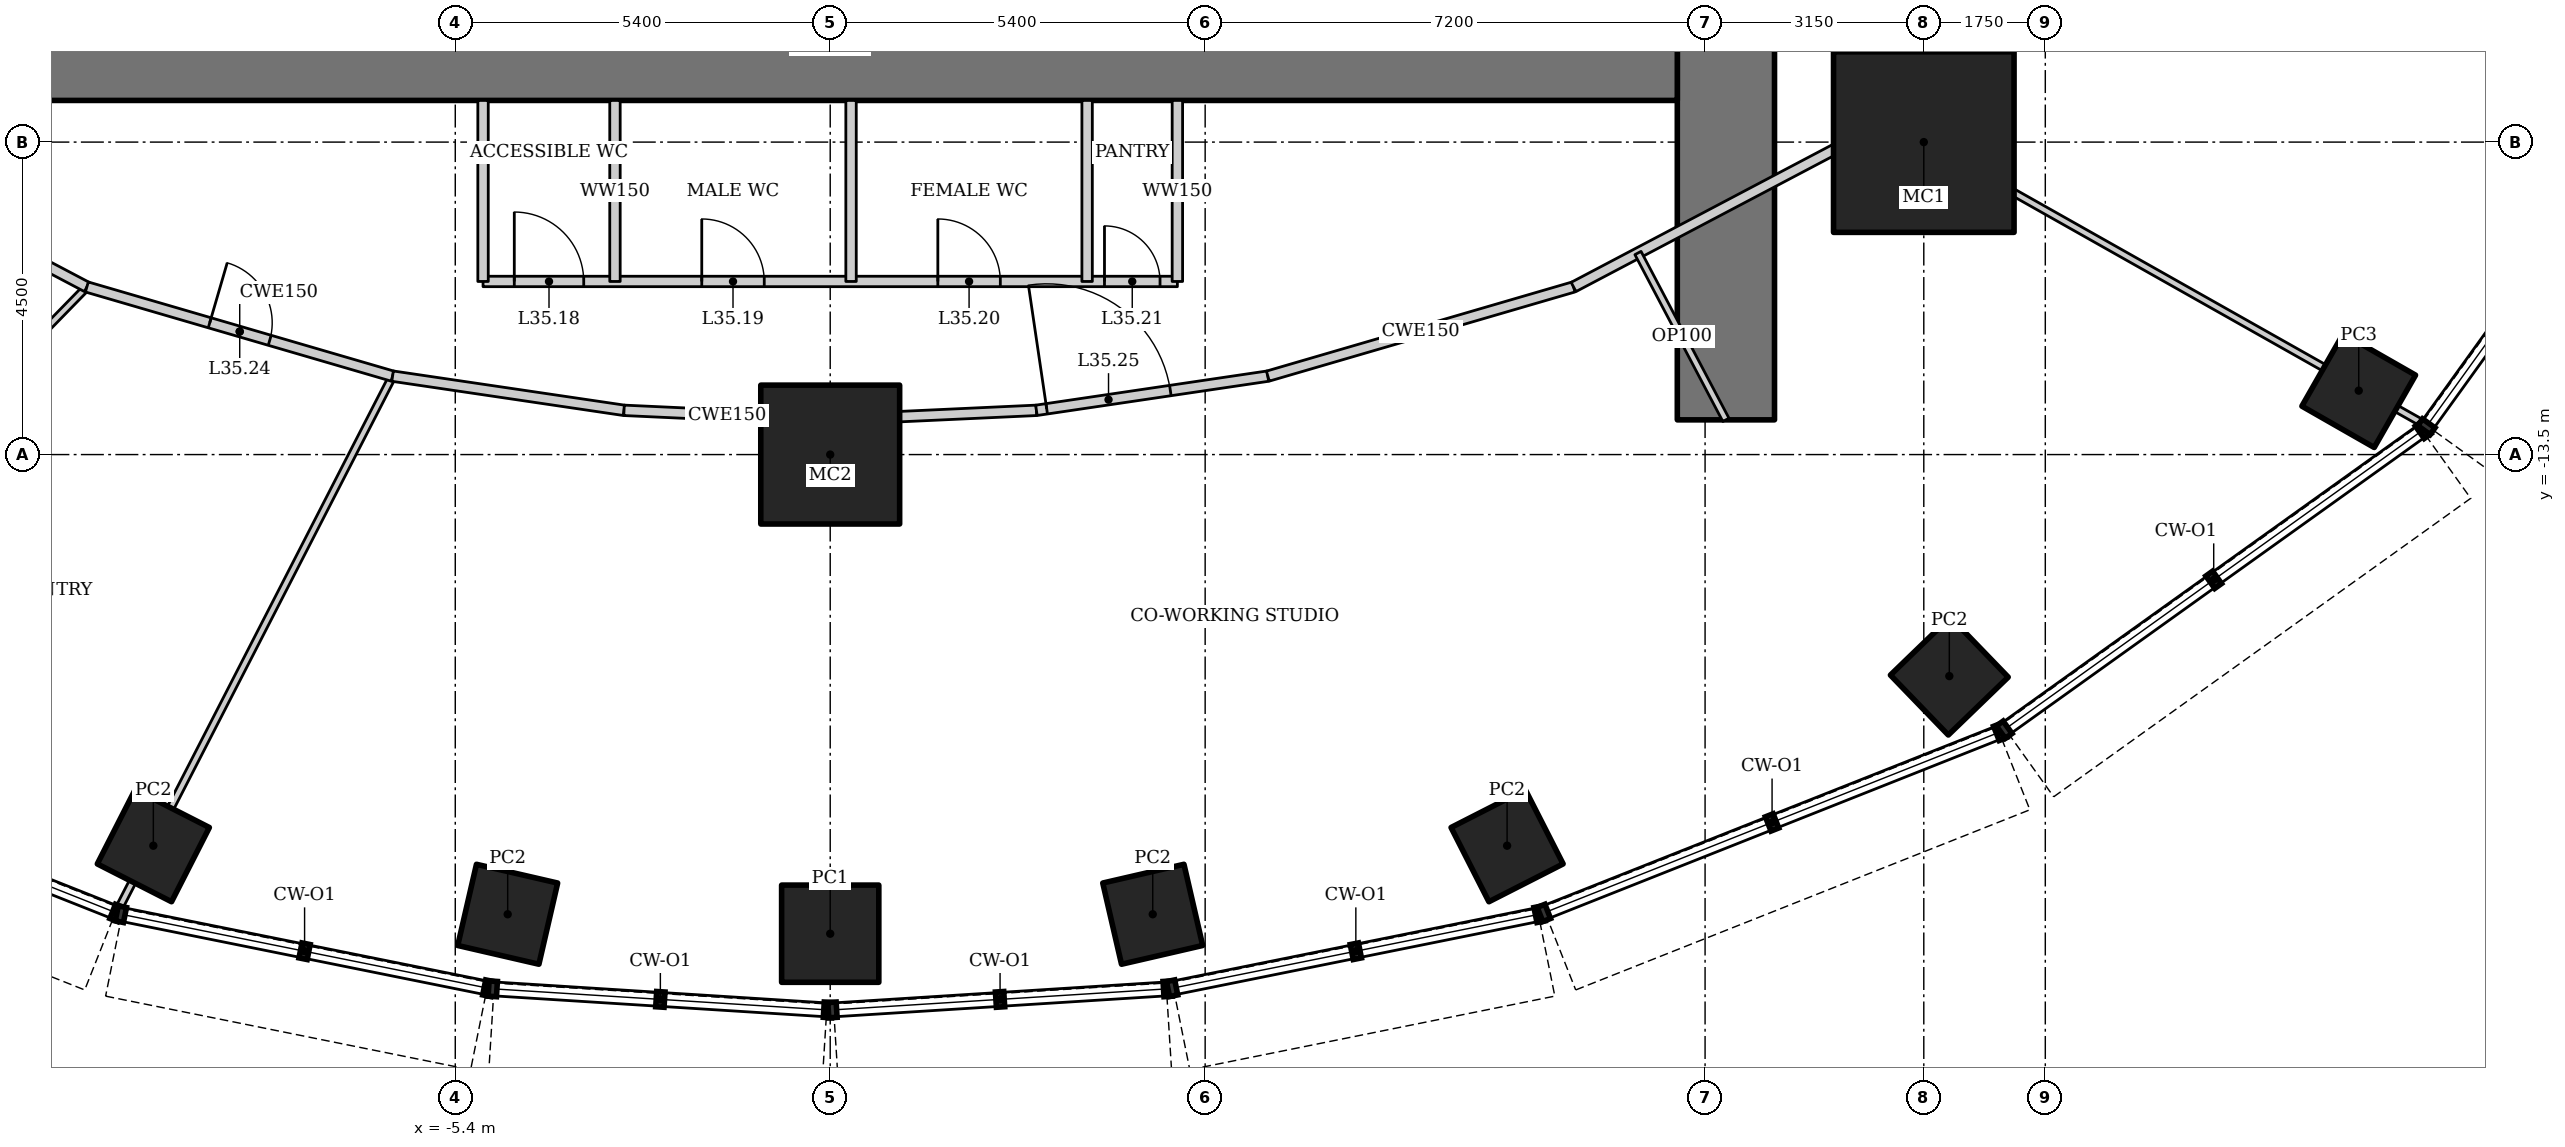
"""IFC4 building model, lengths in metres.
Left out: names, types, materials, properties, quantities, classifications, styles, units other than length and angle.
Written with IfcOpenShell. Run it as: python <this file> out.ifc"""

import sys

from ifc_helpers import new_model, si_unit, direction, frame, frame_2d, origin, origin_2d, place, context, subcontext, project, spatial, rectangle, hollow_rectangle, extrude, element, fill, save


model = new_model("IFC4")
c1 = context("Model", 3, precision=1e-05, world=origin(), true_north=direction((0.0, 1.0)))
c2 = subcontext(c1, "Body", "Model", "MODEL_VIEW")
j1 = project(units=[si_unit("LENGTHUNIT", "METRE"), si_unit("PLANEANGLEUNIT", "RADIAN")], contexts=[c1])
p1 = place(None, origin())
s1 = spatial("IfcSite", under=j1, at=p1, CompositionType="ELEMENT")
p2 = place(p1, origin())
s2 = spatial("IfcBuilding", under=s1, at=p2, CompositionType="ELEMENT")
p3 = place(p2, frame((0.0, 0.0, 151.0)))
s3 = spatial("IfcBuildingStorey", under=s2, at=p3, CompositionType="ELEMENT", Elevation=151.0)
p4 = place(p3, frame((0.0, -13.5, 0.0), z_axis=(0.0, 0.0, 1.0), x_axis=(1.0, 0.0, 0.0)))
e1 = element("IfcColumn", 1, at=p4, inside=s3, PredefinedType="COLUMN", context=c2, shape_type="SweptSolid", body=[
    extrude(hollow_rectangle(XDim=2.0, YDim=2.0, WallThickness=0.17, at=origin_2d()), origin(), (0.0, 0.0, 1.0), 4.2),
])
p5 = place(p3, frame((15.75, -9.0, 0.0), z_axis=(0.0, 0.0, 1.0), x_axis=(1.0, 0.0, 0.0)))
e2 = element("IfcColumn", 2, at=p5, inside=s3, PredefinedType="COLUMN", context=c2, shape_type="SweptSolid", body=[
    extrude(hollow_rectangle(XDim=2.6, YDim=2.6, WallThickness=0.13, at=origin_2d()), origin(), (0.0, 0.0, 1.0), 4.2),
])
for number, where, z_axis, x_axis in (
    (3, (-9.749, -19.133, 0.0), (0.0, 0.0, 1.0), (0.454, 0.891, 0.0)),
    (4, (-4.645, -20.12, 0.0), (0.0, 0.0, 1.0), (0.225, 0.974, 0.0)),
):
    element("IfcColumn", number, at=place(p3, frame(where, z_axis=z_axis, x_axis=x_axis)), inside=s3, PredefinedType="COLUMN", context=c2, shape_type="SweptSolid", body=[
        extrude(hollow_rectangle(XDim=1.2, YDim=1.2, WallThickness=0.1, at=origin_2d()), origin(), (0.0, 0.0, 1.0), 4.2),
    ])
p6 = place(p3, frame((0.0, -20.4, 0.0), z_axis=(0.0, 0.0, 1.0), x_axis=(1.0, 0.0, 0.0)))
e5 = element("IfcColumn", 5, at=p6, inside=s3, PredefinedType="COLUMN", context=c2, shape_type="SweptSolid", body=[
    extrude(hollow_rectangle(XDim=1.4, YDim=1.4, WallThickness=0.1, at=origin_2d()), origin(), (0.0, 0.0, 1.0), 4.2),
])
for number, where, z_axis, x_axis in (
    (6, (4.645, -20.12, 0.0), (0.0, 0.0, 1.0), (0.974, 0.225, 0.0)),
    (7, (9.749, -19.133, 0.0), (0.0, 0.0, 1.0), (0.891, 0.454, 0.0)),
    (8, (16.118, -16.69, 0.0), (0.0, 0.0, 1.0), (0.719, 0.695, 0.0)),
):
    element("IfcColumn", number, at=place(p3, frame(where, z_axis=z_axis, x_axis=x_axis)), inside=s3, PredefinedType="COLUMN", context=c2, shape_type="SweptSolid", body=[
        extrude(hollow_rectangle(XDim=1.2, YDim=1.2, WallThickness=0.1, at=origin_2d()), origin(), (0.0, 0.0, 1.0), 4.2),
    ])
p7 = place(p3, frame((22.014, -12.579, 0.0), z_axis=(0.0, 0.0, 1.0), x_axis=(0.496139221777, 0.86824298017, 0.0)))
e9 = element("IfcColumn", 9, at=p7, inside=s3, PredefinedType="COLUMN", context=c2, shape_type="SweptSolid", body=[
    extrude(hollow_rectangle(XDim=1.2, YDim=1.2, WallThickness=0.12, at=origin_2d()), origin(), (0.0, 0.0, 1.0), 4.2),
])
p8 = place(p3, frame((12.9, -13.0, 0.0), z_axis=(0.0, 0.0, 1.0), x_axis=(0.0, 1.0, 0.0)))
e10 = element("IfcWall", 10, at=p8, inside=s3, PredefinedType="SHEAR", context=c2, shape_type="SweptSolid", body=[
    extrude(rectangle(XDim=26.0, YDim=1.4, at=frame_2d((13.0, 0.0))), origin(), (0.0, 0.0, 1.0), 4.2),
])
p9 = place(p8, frame((12.1, 0.0, 0.0)))
e11 = element("IfcOpeningElement", 11, at=p9, cuts=e10, PredefinedType="OPENING", context=c2, shape_type="SweptSolid", body=[
    extrude(rectangle(XDim=1.8, YDim=2.1, at=frame_2d((0.9, 1.05))), frame((0.0, 0.71, 0.0), z_axis=(0.0, -1.0, 0.0), x_axis=(1.0, 0.0, 0.0)), (0.0, 0.0, 1.0), 1.42),
])
p10 = place(p3, frame((-12.2, -7.6, 0.0), z_axis=(0.0, 0.0, 1.0), x_axis=(1.0, 0.0, 0.0)))
e12 = element("IfcWall", 12, at=p10, inside=s3, PredefinedType="SHEAR", context=c2, shape_type="SweptSolid", body=[
    extrude(rectangle(XDim=24.4, YDim=1.6, at=frame_2d((12.2, 0.0))), origin(), (0.0, 0.0, 1.0), 4.2),
])
p11 = place(p3, frame((-16.882, -17.414, 0.0), z_axis=(0.0, 0.0, 1.0), x_axis=(0.698509457669, 0.715600822769, 0.0)))
e13 = element("IfcWall", 13, at=p11, inside=s3, PredefinedType="PARTITIONING", context=c2, shape_type="SweptSolid", body=[
    extrude(rectangle(XDim=8.842, YDim=0.1, at=frame_2d((4.421, 0.0))), origin(), (0.0, 0.0, 1.0), 3.321),
])
p12 = place(p3, frame((-10.253, -20.052, 0.0), z_axis=(0.0, 0.0, 1.0), x_axis=(0.457326298316, 0.88929896934, 0.0)))
e14 = element("IfcWall", 14, at=p12, inside=s3, PredefinedType="PARTITIONING", context=c2, shape_type="SweptSolid", body=[
    extrude(rectangle(XDim=8.638, YDim=0.1, at=frame_2d((4.319, 0.0))), origin(), (0.0, 0.0, 1.0), 3.349),
])
p13 = place(p3, frame((22.949, -13.059, 0.0), z_axis=(0.0, 0.0, 1.0), x_axis=(-0.870889908693, 0.491478144923, 0.0)))
e15 = element("IfcWall", 15, at=p13, inside=s3, PredefinedType="PARTITIONING", context=c2, shape_type="SweptSolid", body=[
    extrude(rectangle(XDim=8.865, YDim=0.1, at=frame_2d((4.432, 0.0))), origin(), (0.0, 0.0, 1.0), 3.45),
])
p14 = place(p3, frame((-15.229, -8.702, 0.0), z_axis=(0.0, 0.0, 1.0), x_axis=(0.884643590306, -0.466267860924, 0.0)))
e16 = element("IfcWall", 16, at=p14, inside=s3, PredefinedType="PARTITIONING", context=c2, shape_type="SweptSolid", body=[
    extrude(rectangle(XDim=5.113, YDim=0.15, at=frame_2d((2.557, 0.0))), origin(), (0.0, 0.0, 1.0), 4.05),
])
p15 = place(p3, frame((-10.706, -11.086, 0.0), z_axis=(0.0, 0.0, 1.0), x_axis=(0.96001728753, -0.279940721659, 0.0)))
e17 = element("IfcWall", 17, at=p15, inside=s3, PredefinedType="PARTITIONING", context=c2, shape_type="SweptSolid", body=[
    extrude(rectangle(XDim=4.586, YDim=0.15, at=frame_2d((2.293, 0.0))), origin(), (0.0, 0.0, 1.0), 4.05),
])
p16 = place(p15, frame((1.843, 0.0, 0.0)))
e18 = element("IfcOpeningElement", 18, at=p16, cuts=e17, PredefinedType="OPENING", context=c2, shape_type="SweptSolid", body=[
    extrude(rectangle(XDim=0.9, YDim=2.1, at=frame_2d((0.45, 1.05))), frame((0.0, 0.085, 0.0), z_axis=(0.0, -1.0, 0.0), x_axis=(1.0, 0.0, 0.0)), (0.0, 0.0, 1.0), 0.17),
])
p17 = place(p3, frame((-6.303, -12.37, 0.0), z_axis=(0.0, 0.0, 1.0), x_axis=(0.989262902935, -0.146146874329, 0.0)))
e19 = element("IfcWall", 19, at=p17, inside=s3, PredefinedType="PARTITIONING", context=c2, shape_type="SweptSolid", body=[
    extrude(rectangle(XDim=3.369, YDim=0.15, at=frame_2d((1.685, 0.0))), origin(), (0.0, 0.0, 1.0), 4.05),
])
for number, where, z_axis, x_axis in (
    (20, (-2.97, -12.863, 0.0), (0.0, 0.0, 1.0), (0.999, -0.046, 0.0)),
    (21, (0.0, -13.0, 0.0), (0.0, 0.0, 1.0), (0.999, 0.046, 0.0)),
):
    element("IfcWall", number, at=place(p3, frame(where, z_axis=z_axis, x_axis=x_axis)), inside=s3, PredefinedType="PARTITIONING", context=c2, shape_type="SweptSolid", body=[
        extrude(rectangle(XDim=2.973, YDim=0.15, at=frame_2d((1.486, 0.0))), origin(), (0.0, 0.0, 1.0), 4.05),
    ])
p18 = place(p3, frame((2.97, -12.863, 0.0), z_axis=(0.0, 0.0, 1.0), x_axis=(0.989262902935, 0.146146874329, 0.0)))
e22 = element("IfcWall", 22, at=p18, inside=s3, PredefinedType="PARTITIONING", context=c2, shape_type="SweptSolid", body=[
    extrude(rectangle(XDim=3.369, YDim=0.15, at=frame_2d((1.685, 0.0))), origin(), (0.0, 0.0, 1.0), 4.05),
])
p19 = place(p18, frame((0.15, 0.0, 0.0)))
e23 = element("IfcOpeningElement", 23, at=p19, cuts=e22, PredefinedType="OPENING", context=c2, shape_type="SweptSolid", body=[
    extrude(rectangle(XDim=1.8, YDim=2.1, at=frame_2d((0.9, 1.05))), frame((0.0, 0.085, 0.0), z_axis=(0.0, -1.0, 0.0), x_axis=(1.0, 0.0, 0.0)), (0.0, 0.0, 1.0), 0.17),
])
p20 = place(p3, frame((6.303, -12.37, 0.0), z_axis=(0.0, 0.0, 1.0), x_axis=(0.96001728753, 0.279940721659, 0.0)))
e24 = element("IfcWall", 24, at=p20, inside=s3, PredefinedType="PARTITIONING", context=c2, shape_type="SweptSolid", body=[
    extrude(rectangle(XDim=4.586, YDim=0.15, at=frame_2d((2.293, 0.0))), origin(), (0.0, 0.0, 1.0), 4.05),
])
p21 = place(p3, frame((10.706, -11.086, 0.0), z_axis=(0.0, 0.0, 1.0), x_axis=(0.884643590306, 0.466267860924, 0.0)))
e25 = element("IfcWall", 25, at=p21, inside=s3, PredefinedType="PARTITIONING", context=c2, shape_type="SweptSolid", body=[
    extrude(rectangle(XDim=5.113, YDim=0.15, at=frame_2d((2.557, 0.0))), origin(), (0.0, 0.0, 1.0), 4.05),
])
p22 = place(p3, frame((15.229, -8.702, 0.0), z_axis=(0.0, 0.0, 1.0), x_axis=(0.698305033542, 0.715800307439, 0.0)))
e26 = element("IfcWall", 26, at=p22, inside=s3, PredefinedType="PARTITIONING", context=c2, shape_type="SweptSolid", body=[
    extrude(rectangle(XDim=5.512, YDim=0.15, at=frame_2d((2.756, 0.0))), origin(), (0.0, 0.0, 1.0), 4.05),
])
p23 = place(p3, frame((-5.0, -11.007, 0.0), z_axis=(0.0, 0.0, 1.0), x_axis=(1.0, 0.0, 0.0)))
e27 = element("IfcWall", 27, at=p23, inside=s3, PredefinedType="SOLIDWALL", context=c2, shape_type="SweptSolid", body=[
    extrude(rectangle(XDim=10.0, YDim=0.15, at=frame_2d((5.0, 0.0))), origin(), (0.0, 0.0, 1.0), 4.05),
])
p24 = place(p23, frame((0.45, 0.0, 0.0)))
e28 = element("IfcOpeningElement", 28, at=p24, cuts=e27, PredefinedType="OPENING", context=c2, shape_type="SweptSolid", body=[
    extrude(rectangle(XDim=1.0, YDim=2.1, at=frame_2d((0.5, 1.05))), frame((0.0, 0.085, 0.0), z_axis=(0.0, -1.0, 0.0), x_axis=(1.0, 0.0, 0.0)), (0.0, 0.0, 1.0), 0.17),
])
p25 = place(p23, frame((3.15, 0.0, 0.0)))
e29 = element("IfcOpeningElement", 29, at=p25, cuts=e27, PredefinedType="OPENING", context=c2, shape_type="SweptSolid", body=[
    extrude(rectangle(XDim=0.9, YDim=2.1, at=frame_2d((0.45, 1.05))), frame((0.0, 0.085, 0.0), z_axis=(0.0, -1.0, 0.0), x_axis=(1.0, 0.0, 0.0)), (0.0, 0.0, 1.0), 0.17),
])
p26 = place(p23, frame((6.55, 0.0, 0.0)))
e30 = element("IfcOpeningElement", 30, at=p26, cuts=e27, PredefinedType="OPENING", context=c2, shape_type="SweptSolid", body=[
    extrude(rectangle(XDim=0.9, YDim=2.1, at=frame_2d((0.45, 1.05))), frame((0.0, 0.085, 0.0), z_axis=(0.0, -1.0, 0.0), x_axis=(1.0, 0.0, 0.0)), (0.0, 0.0, 1.0), 0.17),
])
p27 = place(p23, frame((8.95, 0.0, 0.0)))
e31 = element("IfcOpeningElement", 31, at=p27, cuts=e27, PredefinedType="OPENING", context=c2, shape_type="SweptSolid", body=[
    extrude(rectangle(XDim=0.8, YDim=2.1, at=frame_2d((0.4, 1.05))), frame((0.0, 0.085, 0.0), z_axis=(0.0, -1.0, 0.0), x_axis=(1.0, 0.0, 0.0)), (0.0, 0.0, 1.0), 0.17),
])
for number, where, z_axis, x_axis in (
    (32, (-5.0, -8.4, 0.0), (0.0, 0.0, 1.0), (0.0, -1.0, 0.0)),
    (33, (5.0, -8.4, 0.0), (0.0, 0.0, 1.0), (0.0, -1.0, 0.0)),
    (34, (-3.1, -8.4, 0.0), (0.0, 0.0, 1.0), (0.0, -1.0, 0.0)),
    (35, (0.3, -8.4, 0.0), (0.0, 0.0, 1.0), (0.0, -1.0, 0.0)),
    (36, (3.7, -8.4, 0.0), (0.0, 0.0, 1.0), (0.0, -1.0, 0.0)),
):
    element("IfcWall", number, at=place(p3, frame(where, z_axis=z_axis, x_axis=x_axis)), inside=s3, PredefinedType="SOLIDWALL", context=c2, shape_type="SweptSolid", body=[
        extrude(rectangle(XDim=2.607, YDim=0.15, at=frame_2d((1.304, 0.0))), origin(), (0.0, 0.0, 1.0), 4.05),
    ])
p28 = place(p3, frame((12.9, -13.0, 0.0), z_axis=(0.0, 0.0, 1.0), x_axis=(-0.466205800243, 0.884676297761, 0.0)))
e37 = element("IfcWall", 37, at=p28, inside=s3, PredefinedType="PARTITIONING", context=c2, shape_type="SweptSolid", body=[
    extrude(rectangle(XDim=2.716, YDim=0.1, at=frame_2d((1.358, 0.0))), origin(), (0.0, 0.0, 1.0), 4.05),
])
p29 = place(p24, origin())
e38 = element("IfcDoor", 38, at=p29, inside=s3, OperationType="SINGLE_SWING_LEFT", PredefinedType="DOOR", context=c2, shape_type="SweptSolid", body=[
    extrude(rectangle(XDim=1.0, YDim=2.1, at=frame_2d((0.5, 1.05))), frame((0.0, 0.025, 0.0), z_axis=(0.0, -1.0, 0.0), x_axis=(1.0, 0.0, 0.0)), (0.0, 0.0, 1.0), 0.05),
])
fill(e28, e38)
p30 = place(p25, origin())
e39 = element("IfcDoor", 39, at=p30, inside=s3, OperationType="SINGLE_SWING_LEFT", PredefinedType="DOOR", context=c2, shape_type="SweptSolid", body=[
    extrude(rectangle(XDim=0.9, YDim=2.1, at=frame_2d((0.45, 1.05))), frame((0.0, 0.025, 0.0), z_axis=(0.0, -1.0, 0.0), x_axis=(1.0, 0.0, 0.0)), (0.0, 0.0, 1.0), 0.05),
])
fill(e29, e39)
p31 = place(p26, origin())
e40 = element("IfcDoor", 40, at=p31, inside=s3, OperationType="SINGLE_SWING_LEFT", PredefinedType="DOOR", context=c2, shape_type="SweptSolid", body=[
    extrude(rectangle(XDim=0.9, YDim=2.1, at=frame_2d((0.45, 1.05))), frame((0.0, 0.025, 0.0), z_axis=(0.0, -1.0, 0.0), x_axis=(1.0, 0.0, 0.0)), (0.0, 0.0, 1.0), 0.05),
])
fill(e30, e40)
p32 = place(p27, origin())
e41 = element("IfcDoor", 41, at=p32, inside=s3, OperationType="SINGLE_SWING_LEFT", PredefinedType="DOOR", context=c2, shape_type="SweptSolid", body=[
    extrude(rectangle(XDim=0.8, YDim=2.1, at=frame_2d((0.4, 1.05))), frame((0.0, 0.025, 0.0), z_axis=(0.0, -1.0, 0.0), x_axis=(1.0, 0.0, 0.0)), (0.0, 0.0, 1.0), 0.05),
])
fill(e31, e41)
p33 = place(p16, origin())
e42 = element("IfcDoor", 42, at=p33, inside=s3, OperationType="SINGLE_SWING_LEFT", PredefinedType="DOOR", context=c2, shape_type="SweptSolid", body=[
    extrude(rectangle(XDim=0.9, YDim=2.1, at=frame_2d((0.45, 1.05))), frame((0.0, 0.025, 0.0), z_axis=(0.0, -1.0, 0.0), x_axis=(1.0, 0.0, 0.0)), (0.0, 0.0, 1.0), 0.05),
])
fill(e18, e42)
p34 = place(p19, origin())
e43 = element("IfcDoor", 43, at=p34, inside=s3, OperationType="DOUBLE_DOOR_DOUBLE_SWING", PredefinedType="DOOR", context=c2, shape_type="SweptSolid", body=[
    extrude(rectangle(XDim=1.8, YDim=2.1, at=frame_2d((0.9, 1.05))), frame((0.0, 0.025, 0.0), z_axis=(0.0, -1.0, 0.0), x_axis=(1.0, 0.0, 0.0)), (0.0, 0.0, 1.0), 0.05),
])
fill(e23, e43)
save(model, sys.argv[1])
